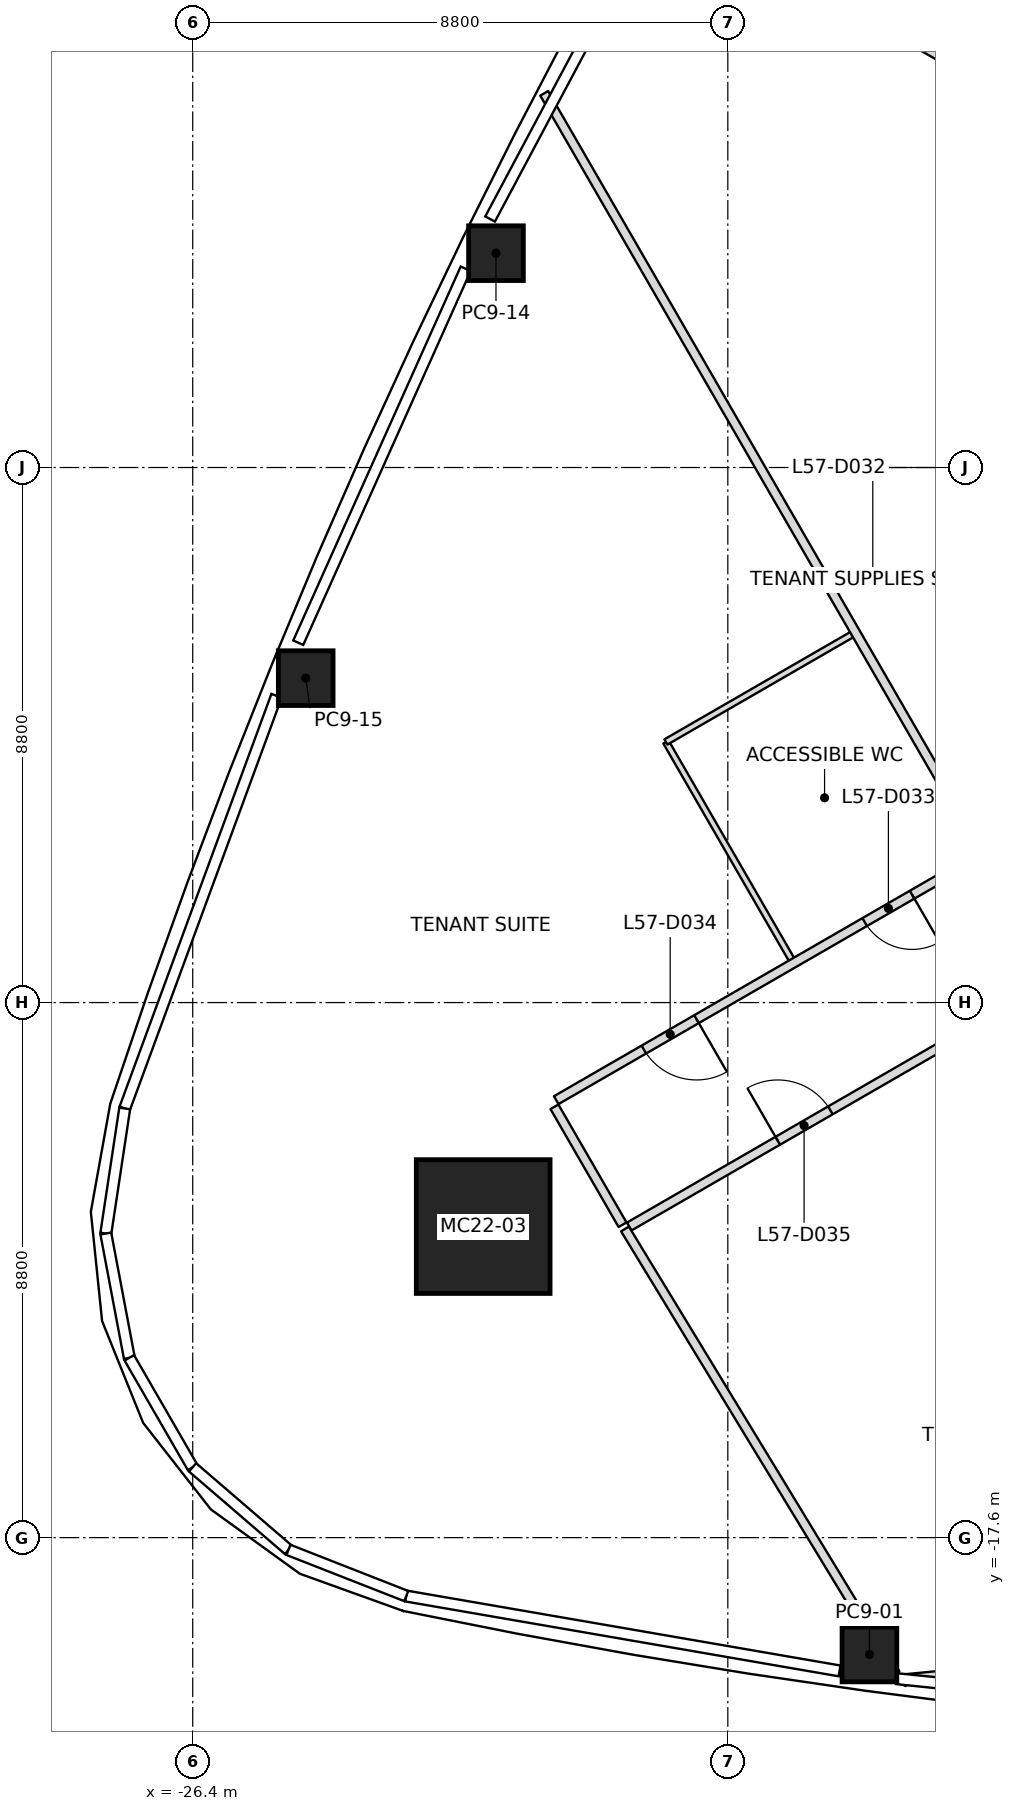
"""IFC4 building model, lengths in metres.
Left out: names, types, materials, properties, quantities, classifications, styles, units other than length and angle.
Written with IfcOpenShell. Run it as: python <this file> out.ifc"""

import sys

from ifc_helpers import new_model, si_unit, direction, frame, frame_2d, origin, origin_2d, place, context, subcontext, project, spatial, rectangle, extrude, element, fill, save


model = new_model("IFC4")
c1 = context("Model", 3, precision=1e-05, world=origin(), true_north=direction((0.0, 1.0)))
c2 = subcontext(c1, "Body", "Model", "MODEL_VIEW")
j1 = project(units=[si_unit("LENGTHUNIT", "METRE"), si_unit("PLANEANGLEUNIT", "RADIAN")], contexts=[c1])
p1 = place(None, origin())
s1 = spatial("IfcSite", under=j1, at=p1, CompositionType="ELEMENT")
p2 = place(p1, origin())
s2 = spatial("IfcBuilding", under=s1, at=p2, CompositionType="ELEMENT")
p3 = place(p2, frame((0.0, 0.0, 255.0)))
s3 = spatial("IfcBuildingStorey", under=s2, at=p3, CompositionType="ELEMENT", Elevation=255.0)
p4 = place(p3, frame((-21.623, -12.484, 0.0), z_axis=(0.027878633223, 0.016043939908, 0.999482553025), x_axis=(0.999611315367, -0.000447457036, -0.02787504211)))
e1 = element("IfcColumn", 1, at=p4, inside=s3, PredefinedType="COLUMN", context=c2, shape_type="SweptSolid", body=[
    extrude(rectangle(XDim=2.2, YDim=2.2, at=origin_2d()), origin(), (0.0, 0.0, 1.0), 4.002),
])
p5 = place(p3, frame((-15.271, -19.522, 0.0), z_axis=(0.017513460473, 0.010373826761, 0.999792809746), x_axis=(-0.990498056196, 0.13660062704, 0.015933278536)))
e2 = element("IfcColumn", 2, at=p5, inside=s3, PredefinedType="COLUMN", context=c2, shape_type="SweptSolid", body=[
    extrude(rectangle(XDim=0.9, YDim=0.9, at=origin_2d()), origin(), (0.0, 0.0, 1.0), 4.001),
])
p6 = place(p3, frame((-21.413, 3.525, 0.0), z_axis=(0.014097691364, 0.002013955909, 0.999898594398), x_axis=(0.439572578629, 0.898171387712, -0.008006648038)))
e3 = element("IfcColumn", 3, at=p6, inside=s3, PredefinedType="COLUMN", context=c2, shape_type="SweptSolid", body=[
    extrude(rectangle(XDim=0.9, YDim=0.9, at=origin_2d()), origin(), (0.0, 0.0, 1.0), 4.0),
])
p7 = place(p3, frame((-24.542, -3.464, 0.0), z_axis=(0.017757551143, 0.009946669541, 0.999792845115), x_axis=(0.377115446107, 0.926029581095, -0.01591085306)))
e4 = element("IfcColumn", 4, at=p7, inside=s3, PredefinedType="COLUMN", context=c2, shape_type="SweptSolid", body=[
    extrude(rectangle(XDim=0.9, YDim=0.9, at=origin_2d()), origin(), (0.0, 0.0, 1.0), 4.001),
])
p8 = place(p3, frame((-13.4, -6.351, 0.0), z_axis=(0.0, 0.0, 1.0), x_axis=(-0.500001511722, 0.866024530989, 0.0)))
e5 = element("IfcWall", 5, at=p8, inside=s3, PredefinedType="PARTITIONING", context=c2, shape_type="SweptSolid", body=[
    extrude(rectangle(XDim=14.439, YDim=0.15, at=frame_2d((7.22, 0.0))), origin(), (0.0, 0.0, 1.0), 3.234),
])
p9 = place(p3, frame((-19.291, -12.523, 0.0), z_axis=(0.0, 0.0, 1.0), x_axis=(0.519733387124, -0.854328511937, 0.0)))
e6 = element("IfcWall", 6, at=p9, inside=s3, PredefinedType="PARTITIONING", context=c2, shape_type="SweptSolid", body=[
    extrude(rectangle(XDim=8.56, YDim=0.15, at=frame_2d((4.28, 0.0))), origin(), (0.0, 0.0, 1.0), 3.3),
])
p10 = place(p3, frame((-9.2, -19.389, 0.0), z_axis=(0.0, 0.0, 1.0), x_axis=(-0.995304202409, -0.096796408342, 0.0)))
e7 = element("IfcWall", 7, at=p10, inside=s3, PredefinedType="PARTITIONING", context=c2, shape_type="SweptSolid", body=[
    extrude(rectangle(XDim=5.519, YDim=0.15, at=frame_2d((2.759, 0.0))), origin(), (0.0, 0.0, 1.0), 3.234),
])
p11 = place(p3, frame((-14.743, -20.01, 0.0), z_axis=(0.0, 0.0, 1.0), x_axis=(0.418254272616, 0.908329985984, 0.0)))
e8 = element("IfcWall", 8, at=p11, inside=s3, PredefinedType="PARTITIONING", context=c2, shape_type="SweptSolid", body=[
    extrude(rectangle(XDim=0.115, YDim=0.15, at=frame_2d((0.058, 0.0))), origin(), (0.0, 0.0, 1.0), 3.3),
])
p12 = place(p3, frame((-20.451, -10.514, 0.0), z_axis=(0.0, 0.0, 1.0), x_axis=(0.49994888933, -0.866054910533, 0.0)))
e9 = element("IfcWall", 9, at=p12, inside=s3, PredefinedType="PARTITIONING", context=c2, shape_type="SweptSolid", body=[
    extrude(rectangle(XDim=2.24, YDim=0.15, at=frame_2d((1.12, 0.0))), origin(), (0.0, 0.0, 1.0), 3.233),
])
p13 = place(p3, frame((-13.4, -6.351, 0.0), z_axis=(0.0, 0.0, 1.0), x_axis=(-0.866035161949, -0.499983097982, 0.0)))
e10 = element("IfcWall", 10, at=p13, inside=s3, PredefinedType="PARTITIONING", context=c2, shape_type="SweptSolid", body=[
    extrude(rectangle(XDim=8.108, YDim=0.15, at=frame_2d((4.054, 0.0))), origin(), (0.0, 0.0, 1.0), 3.3),
])
p14 = place(p13, frame((1.35, 0.0, 0.0)))
e11 = element("IfcOpeningElement", 11, at=p14, cuts=e10, PredefinedType="OPENING", context=c2, shape_type="SweptSolid", body=[
    extrude(rectangle(XDim=0.9, YDim=2.1, at=frame_2d((0.45, 1.05))), frame((0.0, 0.075, 0.0), z_axis=(0.0, -1.0, 0.0), x_axis=(1.0, 0.0, 0.0)), (0.0, 0.0, 1.0), 0.15),
])
p15 = place(p13, frame((5.444, 0.0, 0.0)))
e12 = element("IfcOpeningElement", 12, at=p15, cuts=e10, PredefinedType="OPENING", context=c2, shape_type="SweptSolid", body=[
    extrude(rectangle(XDim=1.0, YDim=2.1, at=frame_2d((0.5, 1.05))), frame((0.0, 0.075, 0.0), z_axis=(0.0, -1.0, 0.0), x_axis=(1.0, 0.0, 0.0)), (0.0, 0.0, 1.0), 0.15),
])
p16 = place(p3, frame((-19.222, -12.483, 0.0), z_axis=(0.0, 0.0, 1.0), x_axis=(0.866026533947, 0.499998042495, 0.0)))
e13 = element("IfcWall", 13, at=p16, inside=s3, PredefinedType="PARTITIONING", context=c2, shape_type="SweptSolid", body=[
    extrude(rectangle(XDim=6.723, YDim=0.15, at=frame_2d((3.361, 0.0))), origin(), (0.0, 0.0, 1.0), 3.233),
])
p17 = place(p16, frame((2.821, 0.0, 0.0)))
e14 = element("IfcOpeningElement", 14, at=p17, cuts=e13, PredefinedType="OPENING", context=c2, shape_type="SweptSolid", body=[
    extrude(rectangle(XDim=1.0, YDim=2.1, at=frame_2d((0.5, 1.05))), frame((0.0, 0.075, 0.0), z_axis=(0.0, -1.0, 0.0), x_axis=(1.0, 0.0, 0.0)), (0.0, 0.0, 1.0), 0.15),
])
p18 = place(p3, frame((-17.322, 8.615, 0.0), z_axis=(0.0, 0.0, 1.0), x_axis=(0.866038353239, -0.499977570215, 0.0)))
e15 = element("IfcWall", 15, at=p18, inside=s3, PredefinedType="PARTITIONING", context=c2, shape_type="SweptSolid", body=[
    extrude(rectangle(XDim=4.529, YDim=0.15, at=frame_2d((2.264, 0.0))), origin(), (0.0, 0.0, 1.0), 3.3),
])
p19 = place(p3, frame((-16.533, -8.125, 0.0), z_axis=(0.0, 0.0, 1.0), x_axis=(-0.499967396439, 0.866044226641, 0.0)))
e16 = element("IfcWall", 16, at=p19, inside=s3, PredefinedType="PARTITIONING", context=c2, shape_type="SweptSolid", body=[
    extrude(rectangle(XDim=4.17, YDim=0.1, at=frame_2d((2.085, 0.0))), origin(), (0.0, 0.0, 1.0), 3.3),
])
p20 = place(p3, frame((-18.618, -4.513, 0.0), z_axis=(0.0, 0.0, 1.0), x_axis=(0.866042098853, 0.499971082179, 0.0)))
e17 = element("IfcWall", 17, at=p20, inside=s3, PredefinedType="PARTITIONING", context=c2, shape_type="SweptSolid", body=[
    extrude(rectangle(XDim=3.57, YDim=0.1, at=frame_2d((1.785, 0.0))), origin(), (0.0, 0.0, 1.0), 3.3),
])
p21 = place(p14, origin())
e18 = element("IfcDoor", 18, at=p21, inside=s3, OperationType="SINGLE_SWING_LEFT", PredefinedType="DOOR", context=c2, shape_type="SweptSolid", body=[
    extrude(rectangle(XDim=0.9, YDim=2.1, at=frame_2d((0.45, 1.05))), frame((0.0, 0.025, 0.0), z_axis=(0.0, -1.0, 0.0), x_axis=(1.0, 0.0, 0.0)), (0.0, 0.0, 1.0), 0.05),
])
fill(e11, e18)
p22 = place(p15, origin())
e19 = element("IfcDoor", 19, at=p22, inside=s3, OperationType="SINGLE_SWING_LEFT", PredefinedType="DOOR", context=c2, shape_type="SweptSolid", body=[
    extrude(rectangle(XDim=1.0, YDim=2.1, at=frame_2d((0.5, 1.05))), frame((0.0, 0.025, 0.0), z_axis=(0.0, -1.0, 0.0), x_axis=(1.0, 0.0, 0.0)), (0.0, 0.0, 1.0), 0.05),
])
fill(e12, e19)
p23 = place(p17, origin())
e20 = element("IfcDoor", 20, at=p23, inside=s3, OperationType="SINGLE_SWING_LEFT", PredefinedType="DOOR", context=c2, shape_type="SweptSolid", body=[
    extrude(rectangle(XDim=1.0, YDim=2.1, at=frame_2d((0.5, 1.05))), frame((0.0, 0.025, 0.0), z_axis=(0.0, -1.0, 0.0), x_axis=(1.0, 0.0, 0.0)), (0.0, 0.0, 1.0), 0.05),
])
fill(e14, e20)
save(model, sys.argv[1])
